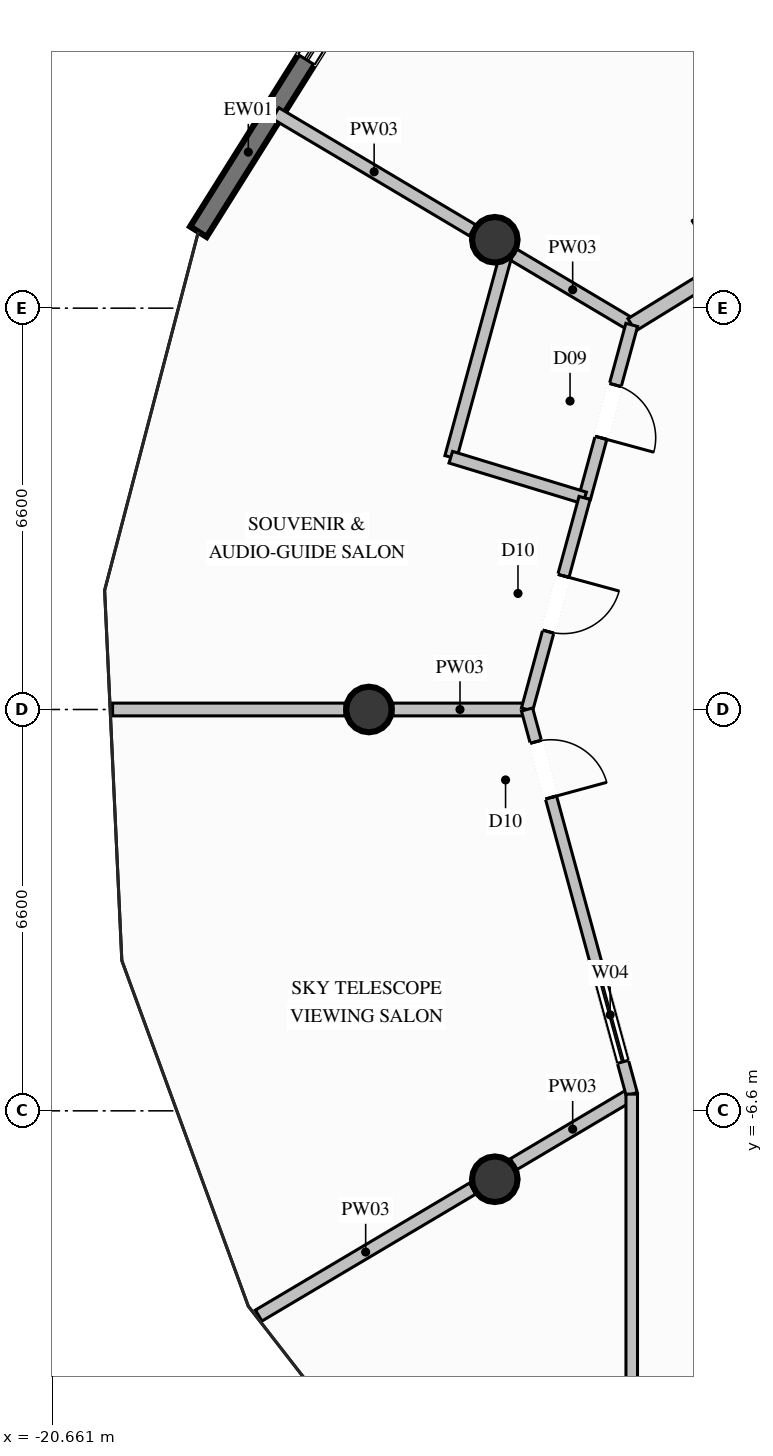
"""IFC4 building model, lengths in metres.
Left out: names, types, materials, properties, quantities, classifications, styles, units other than length and angle.
Written with IfcOpenShell. Run it as: python <this file> out.ifc"""

import sys

from ifc_helpers import new_model, si_unit, direction, frame, frame_2d, origin, origin_2d, place, context, subcontext, project, spatial, rectangle, circle, extrude, element, fill, save


model = new_model("IFC4")
c1 = context("Model", 3, precision=1e-05, world=origin(), true_north=direction((0.0, 1.0)))
c2 = subcontext(c1, "Body", "Model", "MODEL_VIEW")
j1 = project(units=[si_unit("LENGTHUNIT", "METRE"), si_unit("PLANEANGLEUNIT", "RADIAN")], contexts=[c1])
p1 = place(None, origin())
s1 = spatial("IfcSite", under=j1, at=p1, CompositionType="ELEMENT")
p2 = place(p1, origin())
s2 = spatial("IfcBuilding", under=s1, at=p2, CompositionType="ELEMENT")
p3 = place(p2, frame((0.0, 0.0, 297.2)))
s3 = spatial("IfcBuildingStorey", under=s2, at=p3, CompositionType="ELEMENT", Elevation=297.2)
for number, where, z_axis, x_axis in (
    (1, (-13.38, 7.725, 0.0), (0.0, 0.0, 1.0), (1.0, 0.0, 0.0)),
    (2, (-15.45, 0.0, 0.0), (0.0, 0.0, 1.0), (1.0, 0.0, 0.0)),
    (3, (-13.38, -7.725, 0.0), (0.0, 0.0, 1.0), (1.0, 0.0, 0.0)),
):
    element("IfcColumn", number, at=place(p3, frame(where, z_axis=z_axis, x_axis=x_axis)), inside=s3, PredefinedType="COLUMN", context=c2, shape_type="SweptSolid", body=[
        extrude(circle(Radius=0.375, at=origin_2d()), origin(), (0.0, 0.0, 1.0), 5.0),
    ])
p4 = place(p3, frame((-18.255, 7.857, 0.0), z_axis=(0.0, 0.0, 1.0), x_axis=(0.531386665451, 0.847129394945, 0.0)))
e4 = element("IfcWall", 4, at=p4, inside=s3, PredefinedType="SOLIDWALL", context=c2, shape_type="SweptSolid", body=[
    extrude(rectangle(XDim=6.054, YDim=0.32, at=frame_2d((3.027, 0.0))), origin(), (0.0, 0.0, 1.0), 4.72),
])
p5 = place(p4, frame((3.34, 0.0, 0.6)))
e5 = element("IfcOpeningElement", 5, at=p5, cuts=e4, PredefinedType="OPENING", context=c2, shape_type="SweptSolid", body=[
    extrude(rectangle(XDim=1.8, YDim=2.2, at=frame_2d((0.9, 1.1))), frame((0.0, 0.17, 0.0), z_axis=(0.0, -1.0, 0.0), x_axis=(1.0, 0.0, 0.0)), (0.0, 0.0, 1.0), 0.34),
])
p6 = place(p3, frame((-11.128, 6.325, 0.0), z_axis=(0.0, 0.0, 1.0), x_axis=(-0.859601277707, 0.510965403296, 0.0)))
e6 = element("IfcWall", 6, at=p6, inside=s3, PredefinedType="PARTITIONING", context=c2, shape_type="SweptSolid", body=[
    extrude(rectangle(XDim=2.26, YDim=0.21, at=frame_2d((1.13, 0.0))), origin(), (0.0, 0.0, 1.0), 2.905),
])
p7 = place(p3, frame((-13.744, 7.879, 0.0), z_axis=(0.0, 0.0, 1.0), x_axis=(-0.859559716742, 0.511035315174, 0.0)))
e7 = element("IfcWall", 7, at=p7, inside=s3, PredefinedType="PARTITIONING", context=c2, shape_type="SweptSolid", body=[
    extrude(rectangle(XDim=3.771, YDim=0.21, at=frame_2d((1.885, 0.0))), origin(), (0.0, 0.0, 1.0), 4.72),
])
p8 = place(p3, frame((-12.85, 0.0, 0.0), z_axis=(0.0, 0.0, 1.0), x_axis=(-1.0, 0.0, 0.0)))
e8 = element("IfcWall", 8, at=p8, inside=s3, PredefinedType="PARTITIONING", context=c2, shape_type="SweptSolid", body=[
    extrude(rectangle(XDim=2.205, YDim=0.21, at=frame_2d((1.103, 0.0))), origin(), (0.0, 0.0, 1.0), 2.905),
])
p9 = place(p3, frame((-15.845, 0.0, 0.0), z_axis=(0.0, 0.0, 1.0), x_axis=(-1.0, 0.0, 0.0)))
e9 = element("IfcWall", 9, at=p9, inside=s3, PredefinedType="PARTITIONING", context=c2, shape_type="SweptSolid", body=[
    extrude(rectangle(XDim=3.821, YDim=0.21, at=frame_2d((1.911, 0.0))), origin(), (0.0, 0.0, 1.0), 4.72),
])
p10 = place(p3, frame((-11.128, -6.325, 0.0), z_axis=(0.0, 0.0, 1.0), x_axis=(-0.859980712554, -0.510326536675, 0.0)))
e10 = element("IfcWall", 10, at=p10, inside=s3, PredefinedType="PARTITIONING", context=c2, shape_type="SweptSolid", body=[
    extrude(rectangle(XDim=2.26, YDim=0.21, at=frame_2d((1.13, 0.0))), origin(), (0.0, 0.0, 1.0), 2.905),
])
p11 = place(p3, frame((-13.744, -7.878, 0.0), z_axis=(0.0, 0.0, 1.0), x_axis=(-0.859951278994, -0.510376133608, 0.0)))
e11 = element("IfcWall", 11, at=p11, inside=s3, PredefinedType="PARTITIONING", context=c2, shape_type="SweptSolid", body=[
    extrude(rectangle(XDim=4.093, YDim=0.21, at=frame_2d((2.047, 0.0))), origin(), (0.0, 0.0, 1.0), 4.72),
])
p12 = place(p3, frame((-11.128, 6.325, 0.0), z_axis=(0.0, 0.0, 1.0), x_axis=(0.851645088617, 0.524118920699, 0.0)))
e12 = element("IfcWall", 12, at=p12, inside=s3, PredefinedType="PARTITIONING", context=c2, shape_type="SweptSolid", body=[
    extrude(rectangle(XDim=4.436, YDim=0.24, at=frame_2d((2.218, 0.0))), origin(), (0.0, 0.0, 1.0), 4.72),
])
p13 = place(p12, frame((1.743, 0.0, 0.0)))
e13 = element("IfcOpeningElement", 13, at=p13, cuts=e12, PredefinedType="OPENING", context=c2, shape_type="SweptSolid", body=[
    extrude(rectangle(XDim=0.95, YDim=2.1, at=frame_2d((0.475, 1.05))), frame((0.0, 0.13, 0.0), z_axis=(0.0, -1.0, 0.0), x_axis=(1.0, 0.0, 0.0)), (0.0, 0.0, 1.0), 0.26),
])
p14 = place(p3, frame((-11.128, 6.325, 0.0), z_axis=(0.0, 0.0, 1.0), x_axis=(-0.262795224233, -0.964851631144, 0.0)))
e14 = element("IfcWall", 14, at=p14, inside=s3, PredefinedType="PLUMBINGWALL", context=c2, shape_type="SweptSolid", body=[
    extrude(rectangle(XDim=2.95, YDim=0.2, at=frame_2d((1.475, 0.0))), origin(), (0.0, 0.0, 1.0), 4.72),
])
p15 = place(p14, frame((1.025, 0.0, 0.0)))
e15 = element("IfcOpeningElement", 15, at=p15, cuts=e14, PredefinedType="OPENING", context=c2, shape_type="SweptSolid", body=[
    extrude(rectangle(XDim=0.9, YDim=2.1, at=frame_2d((0.45, 1.05))), frame((0.0, 0.11, 0.0), z_axis=(0.0, -1.0, 0.0), x_axis=(1.0, 0.0, 0.0)), (0.0, 0.0, 1.0), 0.22),
])
p16 = place(p3, frame((-13.178, 7.543, 0.0), z_axis=(0.0, 0.0, 1.0), x_axis=(-0.263217227178, -0.964736591675, 0.0)))
e16 = element("IfcWall", 16, at=p16, inside=s3, PredefinedType="PLUMBINGWALL", context=c2, shape_type="SweptSolid", body=[
    extrude(rectangle(XDim=3.518, YDim=0.2, at=frame_2d((1.759, 0.0))), origin(), (0.0, 0.0, 1.0), 4.247),
])
p17 = place(p3, frame((-11.903, 3.479, 0.0), z_axis=(0.0, 0.0, 1.0), x_axis=(-0.956664883705, 0.291191174807, 0.0)))
e17 = element("IfcWall", 17, at=p17, inside=s3, PredefinedType="PLUMBINGWALL", context=c2, shape_type="SweptSolid", body=[
    extrude(rectangle(XDim=2.301, YDim=0.2, at=frame_2d((1.15, 0.0))), origin(), (0.0, 0.0, 1.0), 4.72),
])
p18 = place(p3, frame((-11.903, 3.479, 0.0), z_axis=(0.0, 0.0, 1.0), x_axis=(-0.262653290471, -0.964890278221, 0.0)))
e18 = element("IfcWall", 18, at=p18, inside=s3, PredefinedType="PARTITIONING", context=c2, shape_type="SweptSolid", body=[
    extrude(rectangle(XDim=3.606, YDim=0.19, at=frame_2d((1.803, 0.0))), origin(), (0.0, 0.0, 1.0), 4.72),
])
p19 = place(p18, frame((1.328, 0.0, 0.0)))
e19 = element("IfcOpeningElement", 19, at=p19, cuts=e18, PredefinedType="OPENING", context=c2, shape_type="SweptSolid", body=[
    extrude(rectangle(XDim=0.95, YDim=2.1, at=frame_2d((0.475, 1.05))), frame((0.0, 0.105, 0.0), z_axis=(0.0, -1.0, 0.0), x_axis=(1.0, 0.0, 0.0)), (0.0, 0.0, 1.0), 0.21),
])
p20 = place(p3, frame((-12.85, 0.0, 0.0), z_axis=(0.0, 0.0, 1.0), x_axis=(0.262717156474, -0.964872890952, 0.0)))
e20 = element("IfcWall", 20, at=p20, inside=s3, PredefinedType="PARTITIONING", context=c2, shape_type="SweptSolid", body=[
    extrude(rectangle(XDim=6.555, YDim=0.19, at=frame_2d((3.278, 0.0))), origin(), (0.0, 0.0, 1.0), 4.72),
])
p21 = place(p20, frame((0.55, 0.0, 0.0)))
e21 = element("IfcOpeningElement", 21, at=p21, cuts=e20, PredefinedType="OPENING", context=c2, shape_type="SweptSolid", body=[
    extrude(rectangle(XDim=0.95, YDim=2.1, at=frame_2d((0.475, 1.05))), frame((0.0, 0.105, 0.0), z_axis=(0.0, -1.0, 0.0), x_axis=(1.0, 0.0, 0.0)), (0.0, 0.0, 1.0), 0.21),
])
p22 = place(p20, frame((4.405, 0.0, 0.9)))
e22 = element("IfcOpeningElement", 22, at=p22, cuts=e20, PredefinedType="OPENING", context=c2, shape_type="SweptSolid", body=[
    extrude(rectangle(XDim=1.6, YDim=1.4, at=frame_2d((0.8, 0.7))), frame((0.0, 0.105, 0.0), z_axis=(0.0, -1.0, 0.0), x_axis=(1.0, 0.0, 0.0)), (0.0, 0.0, 1.0), 0.21),
])
p23 = place(p3, frame((-11.128, -6.325, 0.0), z_axis=(0.0, 0.0, 1.0), x_axis=(0.0, -1.0, 0.0)))
e23 = element("IfcWall", 23, at=p23, inside=s3, PredefinedType="PARTITIONING", context=c2, shape_type="SweptSolid", body=[
    extrude(rectangle(XDim=5.475, YDim=0.19, at=frame_2d((2.738, 0.0))), origin(), (0.0, 0.0, 1.0), 4.72),
])
p24 = place(p5, origin())
e24 = element("IfcWindow", 24, at=p24, inside=s3, PartitioningType="SINGLE_PANEL", PredefinedType="SKYLIGHT", context=c2, shape_type="SweptSolid", body=[
    extrude(rectangle(XDim=1.8, YDim=2.2, at=frame_2d((0.9, 1.1))), frame((0.0, 0.03, 0.0), z_axis=(0.0, -1.0, 0.0), x_axis=(1.0, 0.0, 0.0)), (0.0, 0.0, 1.0), 0.06),
])
fill(e5, e24)
p25 = place(p15, origin())
e25 = element("IfcDoor", 25, at=p25, inside=s3, OperationType="SINGLE_SWING_RIGHT", PredefinedType="DOOR", context=c2, shape_type="SweptSolid", body=[
    extrude(rectangle(XDim=0.9, YDim=2.1, at=frame_2d((0.45, 1.05))), frame((0.0, 0.025, 0.0), z_axis=(0.0, -1.0, 0.0), x_axis=(1.0, 0.0, 0.0)), (0.0, 0.0, 1.0), 0.05),
])
fill(e15, e25)
p26 = place(p19, origin())
e26 = element("IfcDoor", 26, at=p26, inside=s3, OperationType="SINGLE_SWING_LEFT", PredefinedType="DOOR", context=c2, shape_type="SweptSolid", body=[
    extrude(rectangle(XDim=0.95, YDim=2.1, at=frame_2d((0.475, 1.05))), frame((0.0, 0.025, 0.0), z_axis=(0.0, -1.0, 0.0), x_axis=(1.0, 0.0, 0.0)), (0.0, 0.0, 1.0), 0.05),
])
fill(e19, e26)
p27 = place(p21, origin())
e27 = element("IfcDoor", 27, at=p27, inside=s3, OperationType="SINGLE_SWING_RIGHT", PredefinedType="DOOR", context=c2, shape_type="SweptSolid", body=[
    extrude(rectangle(XDim=0.95, YDim=2.1, at=frame_2d((0.475, 1.05))), frame((0.0, 0.025, 0.0), z_axis=(0.0, -1.0, 0.0), x_axis=(1.0, 0.0, 0.0)), (0.0, 0.0, 1.0), 0.05),
])
fill(e21, e27)
p28 = place(p22, origin())
e28 = element("IfcWindow", 28, at=p28, inside=s3, PartitioningType="SINGLE_PANEL", PredefinedType="WINDOW", context=c2, shape_type="SweptSolid", body=[
    extrude(rectangle(XDim=1.6, YDim=1.4, at=frame_2d((0.8, 0.7))), frame((0.0, 0.03, 0.0), z_axis=(0.0, -1.0, 0.0), x_axis=(1.0, 0.0, 0.0)), (0.0, 0.0, 1.0), 0.06),
])
fill(e22, e28)
save(model, sys.argv[1])
